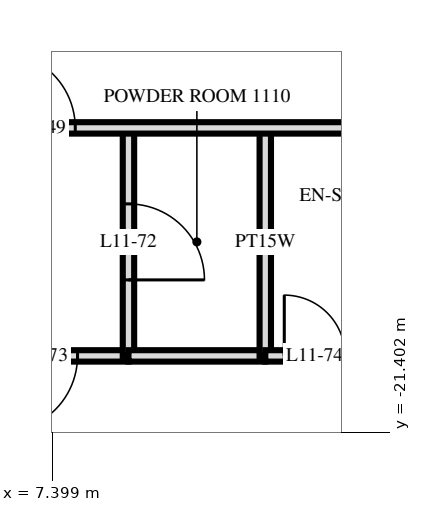
"""IFC4 building model, lengths in metres.
Left out: names, types, materials, properties, quantities, classifications, styles, units other than length and angle.
Written with IfcOpenShell. Run it as: python <this file> out.ifc"""

import sys

from ifc_helpers import new_model, si_unit, direction, frame, frame_2d, origin, place, context, subcontext, project, spatial, rectangle, extrude, element, fill, save


model = new_model("IFC4")
c1 = context("Model", 3, precision=1e-05, world=origin(), true_north=direction((0.0, 1.0)))
c2 = subcontext(c1, "Body", "Model", "MODEL_VIEW")
j1 = project(units=[si_unit("LENGTHUNIT", "METRE"), si_unit("PLANEANGLEUNIT", "RADIAN")], contexts=[c1])
p1 = place(None, origin())
s1 = spatial("IfcSite", under=j1, at=p1, CompositionType="ELEMENT")
p2 = place(p1, origin())
s2 = spatial("IfcBuilding", under=s1, at=p2, CompositionType="ELEMENT")
p3 = place(p2, frame((0.0, 0.0, 49.2)))
s3 = spatial("IfcBuildingStorey", under=s2, at=p3, CompositionType="ELEMENT", Elevation=49.2)
p4 = place(p3, frame((10.2, -20.4, 0.0), z_axis=(0.0, 0.0, 1.0), x_axis=(0.0, 1.0, 0.0)))
e1 = element("IfcWall", 1, at=p4, inside=s3, PredefinedType="PLUMBINGWALL", context=c2, shape_type="SweptSolid", body=[
    extrude(rectangle(XDim=3.0, YDim=0.15, at=frame_2d((1.5, 0.0))), origin(), (0.0, 0.0, 1.0), 3.32),
])
p5 = place(p3, frame((8.4, -20.4, 0.0), z_axis=(0.0, 0.0, 1.0), x_axis=(0.0, 1.0, 0.0)))
e2 = element("IfcWall", 2, at=p5, inside=s3, PredefinedType="PARTITIONING", context=c2, shape_type="SweptSolid", body=[
    extrude(rectangle(XDim=3.0, YDim=0.15, at=frame_2d((1.5, 0.0))), origin(), (0.0, 0.0, 1.0), 3.32),
])
p6 = place(p5, frame((1.0, 0.0, 0.0)))
e3 = element("IfcOpeningElement", 3, at=p6, cuts=e2, PredefinedType="OPENING", context=c2, shape_type="SweptSolid", body=[
    extrude(rectangle(XDim=1.0, YDim=2.1, at=frame_2d((0.5, 1.05))), frame((0.0, 0.085, 0.0), z_axis=(0.0, -1.0, 0.0), x_axis=(1.0, 0.0, 0.0)), (0.0, 0.0, 1.0), 0.17),
])
p7 = place(p3, frame((6.0, -20.4, 0.0), z_axis=(0.0, 0.0, 1.0), x_axis=(1.0, 0.0, 0.0)))
e4 = element("IfcWall", 4, at=p7, inside=s3, PredefinedType="PARTITIONING", context=c2, shape_type="SweptSolid", body=[
    extrude(rectangle(XDim=2.4, YDim=0.15, at=frame_2d((1.2, 0.0))), origin(), (0.0, 0.0, 1.0), 3.32),
])
p8 = place(p7, frame((0.73, 0.0, 0.0)))
e5 = element("IfcOpeningElement", 5, at=p8, cuts=e4, PredefinedType="OPENING", context=c2, shape_type="SweptSolid", body=[
    extrude(rectangle(XDim=1.0, YDim=2.1, at=frame_2d((0.5, 1.05))), frame((0.0, 0.085, 0.0), z_axis=(0.0, -1.0, 0.0), x_axis=(1.0, 0.0, 0.0)), (0.0, 0.0, 1.0), 0.17),
])
p9 = place(p3, frame((10.2, -20.4, 0.0), z_axis=(0.0, 0.0, 1.0), x_axis=(1.0, 0.0, 0.0)))
e6 = element("IfcWall", 6, at=p9, inside=s3, PredefinedType="PARTITIONING", context=c2, shape_type="SweptSolid", body=[
    extrude(rectangle(XDim=7.8, YDim=0.15, at=frame_2d((3.9, 0.0))), origin(), (0.0, 0.0, 1.0), 3.32),
])
p10 = place(p9, frame((0.25, 0.0, 0.0)))
e7 = element("IfcOpeningElement", 7, at=p10, cuts=e6, PredefinedType="OPENING", context=c2, shape_type="SweptSolid", body=[
    extrude(rectangle(XDim=0.8, YDim=2.1, at=frame_2d((0.4, 1.05))), frame((0.0, 0.085, 0.0), z_axis=(0.0, -1.0, 0.0), x_axis=(1.0, 0.0, 0.0)), (0.0, 0.0, 1.0), 0.17),
])
p11 = place(p9, frame((4.03, 0.0, 0.0)))
e8 = element("IfcOpeningElement", 8, at=p11, cuts=e6, PredefinedType="OPENING", context=c2, shape_type="SweptSolid", body=[
    extrude(rectangle(XDim=0.9, YDim=2.1, at=frame_2d((0.45, 1.05))), frame((0.0, 0.085, 0.0), z_axis=(0.0, -1.0, 0.0), x_axis=(1.0, 0.0, 0.0)), (0.0, 0.0, 1.0), 0.17),
])
p12 = place(p9, frame((6.2, 0.0, 0.0)))
e9 = element("IfcOpeningElement", 9, at=p12, cuts=e6, PredefinedType="OPENING", context=c2, shape_type="SweptSolid", body=[
    extrude(rectangle(XDim=0.9, YDim=2.1, at=frame_2d((0.45, 1.05))), frame((0.0, 0.085, 0.0), z_axis=(0.0, -1.0, 0.0), x_axis=(1.0, 0.0, 0.0)), (0.0, 0.0, 1.0), 0.17),
])
p13 = place(p3, frame((8.4, -20.4, 0.0), z_axis=(0.0, 0.0, 1.0), x_axis=(1.0, 0.0, 0.0)))
e10 = element("IfcWall", 10, at=p13, inside=s3, PredefinedType="PLUMBINGWALL", context=c2, shape_type="SweptSolid", body=[
    extrude(rectangle(XDim=1.8, YDim=0.15, at=frame_2d((0.9, 0.0))), origin(), (0.0, 0.0, 1.0), 3.32),
])
p14 = place(p3, frame((-33.12, -17.4, 0.0), z_axis=(0.0, 0.0, 1.0), x_axis=(1.0, 0.0, 0.0)))
e11 = element("IfcWall", 11, at=p14, inside=s3, PredefinedType="PARTITIONING", context=c2, shape_type="SweptSolid", body=[
    extrude(rectangle(XDim=66.24, YDim=0.15, at=frame_2d((33.12, 0.0))), origin(), (0.0, 0.0, 1.0), 3.32),
])
p15 = place(p14, frame((9.27, 0.0, 0.0)))
e12 = element("IfcOpeningElement", 12, at=p15, cuts=e11, PredefinedType="OPENING", context=c2, shape_type="SweptSolid", body=[
    extrude(rectangle(XDim=1.0, YDim=2.1, at=frame_2d((0.5, 1.05))), frame((0.0, 0.085, 0.0), z_axis=(0.0, -1.0, 0.0), x_axis=(1.0, 0.0, 0.0)), (0.0, 0.0, 1.0), 0.17),
])
p16 = place(p14, frame((13.97, 0.0, 0.0)))
e13 = element("IfcOpeningElement", 13, at=p16, cuts=e11, PredefinedType="OPENING", context=c2, shape_type="SweptSolid", body=[
    extrude(rectangle(XDim=1.0, YDim=2.1, at=frame_2d((0.5, 1.05))), frame((0.0, 0.085, 0.0), z_axis=(0.0, -1.0, 0.0), x_axis=(1.0, 0.0, 0.0)), (0.0, 0.0, 1.0), 0.17),
])
p17 = place(p14, frame((15.27, 0.0, 0.0)))
e14 = element("IfcOpeningElement", 14, at=p17, cuts=e11, PredefinedType="OPENING", context=c2, shape_type="SweptSolid", body=[
    extrude(rectangle(XDim=1.0, YDim=2.1, at=frame_2d((0.5, 1.05))), frame((0.0, 0.085, 0.0), z_axis=(0.0, -1.0, 0.0), x_axis=(1.0, 0.0, 0.0)), (0.0, 0.0, 1.0), 0.17),
])
p18 = place(p14, frame((19.97, 0.0, 0.0)))
e15 = element("IfcOpeningElement", 15, at=p18, cuts=e11, PredefinedType="OPENING", context=c2, shape_type="SweptSolid", body=[
    extrude(rectangle(XDim=1.0, YDim=2.1, at=frame_2d((0.5, 1.05))), frame((0.0, 0.085, 0.0), z_axis=(0.0, -1.0, 0.0), x_axis=(1.0, 0.0, 0.0)), (0.0, 0.0, 1.0), 0.17),
])
p19 = place(p14, frame((22.27, 0.0, 0.0)))
e16 = element("IfcOpeningElement", 16, at=p19, cuts=e11, PredefinedType="OPENING", context=c2, shape_type="SweptSolid", body=[
    extrude(rectangle(XDim=1.0, YDim=2.1, at=frame_2d((0.5, 1.05))), frame((0.0, 0.085, 0.0), z_axis=(0.0, -1.0, 0.0), x_axis=(1.0, 0.0, 0.0)), (0.0, 0.0, 1.0), 0.17),
])
p20 = place(p14, frame((28.97, 0.0, 0.0)))
e17 = element("IfcOpeningElement", 17, at=p20, cuts=e11, PredefinedType="OPENING", context=c2, shape_type="SweptSolid", body=[
    extrude(rectangle(XDim=1.0, YDim=2.1, at=frame_2d((0.5, 1.05))), frame((0.0, 0.085, 0.0), z_axis=(0.0, -1.0, 0.0), x_axis=(1.0, 0.0, 0.0)), (0.0, 0.0, 1.0), 0.17),
])
p21 = place(p14, frame((30.27, 0.0, 0.0)))
e18 = element("IfcOpeningElement", 18, at=p21, cuts=e11, PredefinedType="OPENING", context=c2, shape_type="SweptSolid", body=[
    extrude(rectangle(XDim=1.0, YDim=2.1, at=frame_2d((0.5, 1.05))), frame((0.0, 0.085, 0.0), z_axis=(0.0, -1.0, 0.0), x_axis=(1.0, 0.0, 0.0)), (0.0, 0.0, 1.0), 0.17),
])
p22 = place(p14, frame((34.97, 0.0, 0.0)))
e19 = element("IfcOpeningElement", 19, at=p22, cuts=e11, PredefinedType="OPENING", context=c2, shape_type="SweptSolid", body=[
    extrude(rectangle(XDim=1.0, YDim=2.1, at=frame_2d((0.5, 1.05))), frame((0.0, 0.085, 0.0), z_axis=(0.0, -1.0, 0.0), x_axis=(1.0, 0.0, 0.0)), (0.0, 0.0, 1.0), 0.17),
])
p23 = place(p14, frame((36.27, 0.0, 0.0)))
e20 = element("IfcOpeningElement", 20, at=p23, cuts=e11, PredefinedType="OPENING", context=c2, shape_type="SweptSolid", body=[
    extrude(rectangle(XDim=1.0, YDim=2.1, at=frame_2d((0.5, 1.05))), frame((0.0, 0.085, 0.0), z_axis=(0.0, -1.0, 0.0), x_axis=(1.0, 0.0, 0.0)), (0.0, 0.0, 1.0), 0.17),
])
p24 = place(p14, frame((39.82, 0.0, 0.0)))
e21 = element("IfcOpeningElement", 21, at=p24, cuts=e11, PredefinedType="OPENING", context=c2, shape_type="SweptSolid", body=[
    extrude(rectangle(XDim=1.0, YDim=2.1, at=frame_2d((0.5, 1.05))), frame((0.0, 0.085, 0.0), z_axis=(0.0, -1.0, 0.0), x_axis=(1.0, 0.0, 0.0)), (0.0, 0.0, 1.0), 0.17),
])
p25 = place(p14, frame((51.27, 0.0, 0.0)))
e22 = element("IfcOpeningElement", 22, at=p25, cuts=e11, PredefinedType="OPENING", context=c2, shape_type="SweptSolid", body=[
    extrude(rectangle(XDim=1.0, YDim=2.1, at=frame_2d((0.5, 1.05))), frame((0.0, 0.085, 0.0), z_axis=(0.0, -1.0, 0.0), x_axis=(1.0, 0.0, 0.0)), (0.0, 0.0, 1.0), 0.17),
])
p26 = place(p14, frame((4.42, 0.0, 0.0)))
e23 = element("IfcOpeningElement", 23, at=p26, cuts=e11, PredefinedType="OPENING", context=c2, shape_type="SweptSolid", body=[
    extrude(rectangle(XDim=1.0, YDim=2.1, at=frame_2d((0.5, 1.05))), frame((0.0, 0.085, 0.0), z_axis=(0.0, -1.0, 0.0), x_axis=(1.0, 0.0, 0.0)), (0.0, 0.0, 1.0), 0.17),
])
p27 = place(p14, frame((54.82, 0.0, 0.0)))
e24 = element("IfcOpeningElement", 24, at=p27, cuts=e11, PredefinedType="OPENING", context=c2, shape_type="SweptSolid", body=[
    extrude(rectangle(XDim=1.0, YDim=2.1, at=frame_2d((0.5, 1.05))), frame((0.0, 0.085, 0.0), z_axis=(0.0, -1.0, 0.0), x_axis=(1.0, 0.0, 0.0)), (0.0, 0.0, 1.0), 0.17),
])
p28 = place(p24, origin())
e25 = element("IfcDoor", 25, at=p28, inside=s3, OperationType="SINGLE_SWING_RIGHT", PredefinedType="DOOR", context=c2, shape_type="SweptSolid", body=[
    extrude(rectangle(XDim=1.0, YDim=2.1, at=frame_2d((0.5, 1.05))), frame((0.0, 0.025, 0.0), z_axis=(0.0, -1.0, 0.0), x_axis=(1.0, 0.0, 0.0)), (0.0, 0.0, 1.0), 0.05),
])
fill(e21, e25)
p29 = place(p6, frame((0.5, 0.0, 0.0), z_axis=(0.0, 0.0, 1.0), x_axis=(-1.0, 0.0, 0.0)))
e26 = element("IfcDoor", 26, at=p29, inside=s3, OperationType="SINGLE_SWING_LEFT", PredefinedType="DOOR", context=c2, shape_type="SweptSolid", body=[
    extrude(rectangle(XDim=1.0, YDim=2.1, at=frame_2d((0.0, 1.05))), frame((0.0, -0.025, 0.0), z_axis=(0.0, 1.0, 0.0), x_axis=(-1.0, 0.0, 0.0)), (0.0, 0.0, 1.0), 0.05),
])
fill(e3, e26)
p30 = place(p8, frame((0.5, 0.0, 0.0), z_axis=(0.0, 0.0, 1.0), x_axis=(-1.0, 0.0, 0.0)))
e27 = element("IfcDoor", 27, at=p30, inside=s3, OperationType="SINGLE_SWING_LEFT", PredefinedType="DOOR", context=c2, shape_type="SweptSolid", body=[
    extrude(rectangle(XDim=1.0, YDim=2.1, at=frame_2d((0.0, 1.05))), frame((0.0, -0.025, 0.0), z_axis=(0.0, 1.0, 0.0), x_axis=(-1.0, 0.0, 0.0)), (0.0, 0.0, 1.0), 0.05),
])
fill(e5, e27)
p31 = place(p10, origin())
e28 = element("IfcDoor", 28, at=p31, inside=s3, OperationType="SINGLE_SWING_RIGHT", PredefinedType="DOOR", context=c2, shape_type="SweptSolid", body=[
    extrude(rectangle(XDim=0.8, YDim=2.1, at=frame_2d((0.4, 1.05))), frame((0.0, 0.025, 0.0), z_axis=(0.0, -1.0, 0.0), x_axis=(1.0, 0.0, 0.0)), (0.0, 0.0, 1.0), 0.05),
])
fill(e7, e28)
save(model, sys.argv[1])
